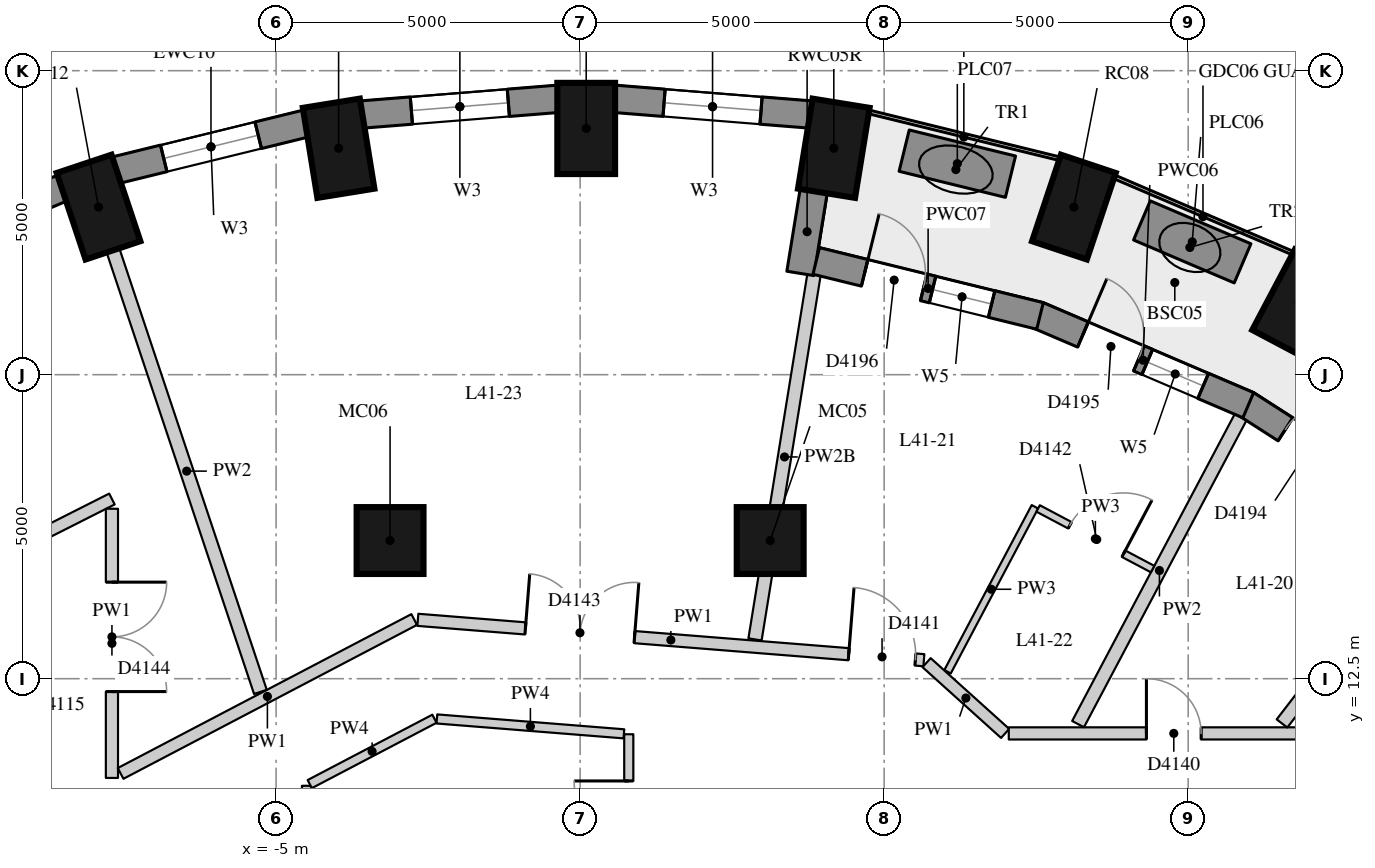
"""IFC4 building model, lengths in metres.
Left out: names, types, materials, properties, quantities, classifications, styles, units other than length and angle.
Written with IfcOpenShell. Run it as: python <this file> out.ifc"""

import sys

from ifc_helpers import new_model, si_unit, direction, frame, frame_2d, origin, origin_2d, place, context, subcontext, project, spatial, rectangle, extrude, element, fill, save


model = new_model("IFC4")
c1 = context("Model", 3, precision=1e-05, world=origin(), true_north=direction((0.0, 1.0)))
c2 = subcontext(c1, "Body", "Model", "MODEL_VIEW")
j1 = project(units=[si_unit("LENGTHUNIT", "METRE"), si_unit("PLANEANGLEUNIT", "RADIAN")], contexts=[c1])
p1 = place(None, origin())
s1 = spatial("IfcSite", under=j1, at=p1, CompositionType="ELEMENT")
p2 = place(p1, origin())
s2 = spatial("IfcBuilding", under=s1, at=p2, CompositionType="ELEMENT")
p3 = place(p2, frame((0.0, 0.0, 148.4)))
s3 = spatial("IfcBuildingStorey", under=s2, at=p3, CompositionType="ELEMENT", Elevation=148.4)
for number, where, z_axis, x_axis in (
    (1, (11.825, 18.676, 0.0), (0.0, 0.0, 1.0), (0.468, 0.884, 0.0)),
    (2, (8.12, 20.256, 0.0), (0.0, 0.0, 1.0), (0.317, 0.949, 0.0)),
    (3, (4.172, 21.224, 0.0), (0.0, 0.0, 1.0), (0.16, 0.987, 0.0)),
    (4, (0.1, 21.55, 0.0), (0.0, 0.0, 1.0), (0.0, 1.0, 0.0)),
    (5, (-3.972, 21.224, 0.0), (0.0, 0.0, 1.0), (-0.16, 0.987, 0.0)),
    (6, (-7.92, 20.256, 0.0), (0.0, 0.0, 1.0), (-0.317, 0.949, 0.0)),
):
    element("IfcColumn", number, at=place(p3, frame(where, z_axis=z_axis, x_axis=x_axis)), inside=s3, PredefinedType="COLUMN", context=c2, shape_type="SweptSolid", body=[
        extrude(rectangle(XDim=1.5, YDim=0.95, at=origin_2d()), origin(), (0.0, 0.0, 1.0), 3.3),
    ])
for number, where, z_axis, x_axis in (
    (7, (3.126, 14.772, 0.0), (0.0, 0.0, 1.0), (1.0, 0.0, 0.0)),
    (8, (-3.126, 14.772, 0.0), (0.0, 0.0, 1.0), (1.0, 0.0, 0.0)),
):
    element("IfcColumn", number, at=place(p3, frame(where, z_axis=z_axis, x_axis=x_axis)), inside=s3, PredefinedType="COLUMN", context=c2, shape_type="SweptSolid", body=[
        extrude(rectangle(XDim=1.1, YDim=1.1, at=origin_2d()), origin(), (0.0, 0.0, 1.0), 3.3),
    ])
p4 = place(p3, frame((3.801, 21.778, 0.0), z_axis=(0.0, 0.0, 1.0), x_axis=(-0.996812416891, 0.079780984773, 0.0)))
e9 = element("IfcWall", 9, at=p4, inside=s3, PredefinedType="SOLIDWALL", context=c2, shape_type="SweptSolid", body=[
    extrude(rectangle(XDim=3.256, YDim=0.45, at=frame_2d((1.628, 0.0))), origin(), (0.0, 0.0, 1.0), 3.02),
])
p5 = place(p4, frame((0.828, 0.0, 0.4)))
e10 = element("IfcOpeningElement", 10, at=p5, cuts=e9, PredefinedType="OPENING", context=c2, shape_type="SweptSolid", body=[
    extrude(rectangle(XDim=1.6, YDim=1.75, at=frame_2d((0.8, 0.875))), frame((0.0, 0.235, 0.0), z_axis=(0.0, -1.0, 0.0), x_axis=(1.0, 0.0, 0.0)), (0.0, 0.0, 1.0), 0.47),
])
p6 = place(p3, frame((-0.355, 22.038, 0.0), z_axis=(0.0, 0.0, 1.0), x_axis=(-0.996812416891, -0.079780984773, 0.0)))
e11 = element("IfcWall", 11, at=p6, inside=s3, PredefinedType="SOLIDWALL", context=c2, shape_type="SweptSolid", body=[
    extrude(rectangle(XDim=3.256, YDim=0.45, at=frame_2d((1.628, 0.0))), origin(), (0.0, 0.0, 1.0), 3.02),
])
p7 = place(p6, frame((0.828, 0.0, 0.4)))
e12 = element("IfcOpeningElement", 12, at=p7, cuts=e11, PredefinedType="OPENING", context=c2, shape_type="SweptSolid", body=[
    extrude(rectangle(XDim=1.6, YDim=1.75, at=frame_2d((0.8, 0.875))), frame((0.0, 0.235, 0.0), z_axis=(0.0, -1.0, 0.0), x_axis=(1.0, 0.0, 0.0)), (0.0, 0.0, 1.0), 0.47),
])
p8 = place(p3, frame((-4.499, 21.633, 0.0), z_axis=(0.0, 0.0, 1.0), x_axis=(-0.971232901476, -0.238131583563, 0.0)))
e13 = element("IfcWall", 13, at=p8, inside=s3, PredefinedType="SOLIDWALL", context=c2, shape_type="SweptSolid", body=[
    extrude(rectangle(XDim=3.237, YDim=0.45, at=frame_2d((1.618, 0.0))), origin(), (0.0, 0.0, 1.0), 3.02),
])
p9 = place(p8, frame((0.818, 0.0, 0.4)))
e14 = element("IfcOpeningElement", 14, at=p9, cuts=e13, PredefinedType="OPENING", context=c2, shape_type="SweptSolid", body=[
    extrude(rectangle(XDim=1.6, YDim=1.75, at=frame_2d((0.8, 0.875))), frame((0.0, 0.235, 0.0), z_axis=(0.0, -1.0, 0.0), x_axis=(1.0, 0.0, 0.0)), (0.0, 0.0, 1.0), 0.47),
])
p10 = place(p3, frame((-8.506, 20.574, 0.0), z_axis=(0.0, 0.0, 1.0), x_axis=(-0.919798725687, -0.392390499663, 0.0)))
e15 = element("IfcWall", 15, at=p10, inside=s3, PredefinedType="SOLIDWALL", context=c2, shape_type="SweptSolid", body=[
    extrude(rectangle(XDim=3.2, YDim=0.45, at=frame_2d((1.6, 0.0))), origin(), (0.0, 0.0, 1.0), 3.02),
])
p11 = place(p10, frame((0.8, 0.0, 0.4)))
e16 = element("IfcOpeningElement", 16, at=p11, cuts=e15, PredefinedType="OPENING", context=c2, shape_type="SweptSolid", body=[
    extrude(rectangle(XDim=1.6, YDim=1.75, at=frame_2d((0.8, 0.875))), frame((0.0, 0.235, 0.0), z_axis=(0.0, -1.0, 0.0), x_axis=(1.0, 0.0, 0.0)), (0.0, 0.0, 1.0), 0.47),
])
p12 = place(p3, frame((3.844, 20.538, 0.0), z_axis=(0.0, 0.0, 1.0), x_axis=(-0.159641024018, -0.98717513312, 0.0)))
e17 = element("IfcWall", 17, at=p12, inside=s3, PredefinedType="SOLIDWALL", context=c2, shape_type="SweptSolid", body=[
    extrude(rectangle(XDim=1.39, YDim=0.45, at=frame_2d((0.695, 0.0))), origin(), (0.0, 0.0, 1.0), 2.57),
])
p13 = place(p3, frame((14.054, 15.025, 0.0), z_axis=(0.0, 0.0, 1.0), x_axis=(-0.841393801846, 0.54042249233, 0.0)))
e18 = element("IfcWall", 18, at=p13, inside=s3, PredefinedType="SOLIDWALL", context=c2, shape_type="SweptSolid", body=[
    extrude(rectangle(XDim=3.683, YDim=0.45, at=frame_2d((1.841, 0.0))), origin(), (0.0, 0.0, 1.0), 3.02),
])
p14 = place(p13, frame((0.766, 0.0, 0.4)))
e19 = element("IfcOpeningElement", 19, at=p14, cuts=e18, PredefinedType="OPENING", context=c2, shape_type="SweptSolid", body=[
    extrude(rectangle(XDim=1.0, YDim=1.75, at=frame_2d((0.5, 0.875))), frame((0.0, 0.235, 0.0), z_axis=(0.0, -1.0, 0.0), x_axis=(1.0, 0.0, 0.0)), (0.0, 0.0, 1.0), 0.47),
])
p15 = place(p13, frame((1.916, 0.0, 0.0)))
e20 = element("IfcOpeningElement", 20, at=p15, cuts=e18, PredefinedType="OPENING", context=c2, shape_type="SweptSolid", body=[
    extrude(rectangle(XDim=1.0, YDim=2.15, at=frame_2d((0.5, 1.075))), frame((0.0, 0.235, 0.0), z_axis=(0.0, -1.0, 0.0), x_axis=(1.0, 0.0, 0.0)), (0.0, 0.0, 1.0), 0.47),
])
p16 = place(p3, frame((10.988, 16.998, 0.0), z_axis=(0.0, 0.0, 1.0), x_axis=(-0.919443425894, 0.393222311907, 0.0)))
e21 = element("IfcWall", 21, at=p16, inside=s3, PredefinedType="SOLIDWALL", context=c2, shape_type="SweptSolid", body=[
    extrude(rectangle(XDim=3.763, YDim=0.45, at=frame_2d((1.882, 0.0))), origin(), (0.0, 0.0, 1.0), 3.02),
])
p17 = place(p16, frame((0.807, 0.0, 0.4)))
e22 = element("IfcOpeningElement", 22, at=p17, cuts=e21, PredefinedType="OPENING", context=c2, shape_type="SweptSolid", body=[
    extrude(rectangle(XDim=1.0, YDim=1.75, at=frame_2d((0.5, 0.875))), frame((0.0, 0.235, 0.0), z_axis=(0.0, -1.0, 0.0), x_axis=(1.0, 0.0, 0.0)), (0.0, 0.0, 1.0), 0.47),
])
p18 = place(p16, frame((1.957, 0.0, 0.0)))
e23 = element("IfcOpeningElement", 23, at=p18, cuts=e21, PredefinedType="OPENING", context=c2, shape_type="SweptSolid", body=[
    extrude(rectangle(XDim=1.0, YDim=2.15, at=frame_2d((0.5, 1.075))), frame((0.0, 0.235, 0.0), z_axis=(0.0, -1.0, 0.0), x_axis=(1.0, 0.0, 0.0)), (0.0, 0.0, 1.0), 0.47),
])
p19 = place(p3, frame((7.563, 18.466, 0.0), z_axis=(0.0, 0.0, 1.0), x_axis=(-0.97110866251, 0.238637728782, 0.0)))
e24 = element("IfcWall", 24, at=p19, inside=s3, PredefinedType="SOLIDWALL", context=c2, shape_type="SweptSolid", body=[
    extrude(rectangle(XDim=3.789, YDim=0.45, at=frame_2d((1.895, 0.0))), origin(), (0.0, 0.0, 1.0), 3.02),
])
p20 = place(p19, frame((0.82, 0.0, 0.4)))
e25 = element("IfcOpeningElement", 25, at=p20, cuts=e24, PredefinedType="OPENING", context=c2, shape_type="SweptSolid", body=[
    extrude(rectangle(XDim=1.0, YDim=1.75, at=frame_2d((0.5, 0.875))), frame((0.0, 0.235, 0.0), z_axis=(0.0, -1.0, 0.0), x_axis=(1.0, 0.0, 0.0)), (0.0, 0.0, 1.0), 0.47),
])
p21 = place(p19, frame((1.97, 0.0, 0.0)))
e26 = element("IfcOpeningElement", 26, at=p21, cuts=e24, PredefinedType="OPENING", context=c2, shape_type="SweptSolid", body=[
    extrude(rectangle(XDim=1.0, YDim=2.15, at=frame_2d((0.5, 1.075))), frame((0.0, 0.235, 0.0), z_axis=(0.0, -1.0, 0.0), x_axis=(1.0, 0.0, 0.0)), (0.0, 0.0, 1.0), 0.47),
])
for number, where, z_axis, x_axis in (
    (27, (10.895, 19.331, 0.0), (0.0, 0.0, 1.0), (-0.92, 0.392, 0.0)),
    (28, (7.077, 20.757, 0.0), (0.0, 0.0, 1.0), (-0.971, 0.238, 0.0)),
):
    element("IfcWall", number, at=place(p3, frame(where, z_axis=z_axis, x_axis=x_axis)), inside=s3, PredefinedType="USERDEFINED", context=c2, shape_type="SweptSolid", body=[
        extrude(rectangle(XDim=1.8, YDim=0.7, at=frame_2d((0.9, 0.0))), origin(), (0.0, 0.0, 1.0), 0.75),
    ])
p22 = place(p3, frame((-10.416, 14.082, 0.0), z_axis=(0.0, 0.0, 1.0), x_axis=(0.892396808139, 0.451251522793, 0.0)))
e29 = element("IfcWall", 29, at=p22, inside=s3, PredefinedType="PARTITIONING", context=c2, shape_type="SweptSolid", body=[
    extrude(rectangle(XDim=3.044, YDim=0.2, at=frame_2d((1.522, 0.0))), origin(), (0.0, 0.0, 1.0), 3.02),
])
p23 = place(p3, frame((-7.7, 15.295, 0.0), z_axis=(0.0, 0.0, 1.0), x_axis=(0.0, -1.0, 0.0)))
e30 = element("IfcWall", 30, at=p23, inside=s3, PredefinedType="PARTITIONING", context=c2, shape_type="SweptSolid", body=[
    extrude(rectangle(XDim=4.427, YDim=0.2, at=frame_2d((2.214, 0.0))), origin(), (0.0, 0.0, 1.0), 3.02),
])
p24 = place(p23, frame((1.207, 0.0, 0.0)))
e31 = element("IfcOpeningElement", 31, at=p24, cuts=e30, PredefinedType="OPENING", context=c2, shape_type="SweptSolid", body=[
    extrude(rectangle(XDim=1.8, YDim=2.1, at=frame_2d((0.9, 1.05))), frame((0.0, 0.11, 0.0), z_axis=(0.0, -1.0, 0.0), x_axis=(1.0, 0.0, 0.0)), (0.0, 0.0, 1.0), 0.22),
])
p25 = place(p3, frame((-7.557, 10.942, 0.0), z_axis=(0.0, 0.0, 1.0), x_axis=(0.885672830659, 0.464309850244, 0.0)))
e32 = element("IfcWall", 32, at=p25, inside=s3, PredefinedType="PARTITIONING", context=c2, shape_type="SweptSolid", body=[
    extrude(rectangle(XDim=5.452, YDim=0.2, at=frame_2d((2.726, 0.0))), origin(), (0.0, 0.0, 1.0), 3.02),
])
p26 = place(p3, frame((-2.669, 13.468, 0.0), z_axis=(0.0, 0.0, 1.0), x_axis=(0.996831622407, -0.079540659849, 0.0)))
e33 = element("IfcWall", 33, at=p26, inside=s3, PredefinedType="PARTITIONING", context=c2, shape_type="SweptSolid", body=[
    extrude(rectangle(XDim=8.349, YDim=0.2, at=frame_2d((4.174, 0.0))), origin(), (0.0, 0.0, 1.0), 3.02),
])
p27 = place(p26, frame((7.109, 0.0, 0.0)))
e34 = element("IfcOpeningElement", 34, at=p27, cuts=e33, PredefinedType="OPENING", context=c2, shape_type="SweptSolid", body=[
    extrude(rectangle(XDim=1.1, YDim=2.1, at=frame_2d((0.55, 1.05))), frame((0.0, 0.11, 0.0), z_axis=(0.0, -1.0, 0.0), x_axis=(1.0, 0.0, 0.0)), (0.0, 0.0, 1.0), 0.22),
])
p28 = place(p26, frame((1.775, 0.0, 0.0)))
e35 = element("IfcOpeningElement", 35, at=p28, cuts=e33, PredefinedType="OPENING", context=c2, shape_type="SweptSolid", body=[
    extrude(rectangle(XDim=1.8, YDim=2.1, at=frame_2d((0.9, 1.05))), frame((0.0, 0.11, 0.0), z_axis=(0.0, -1.0, 0.0), x_axis=(1.0, 0.0, 0.0)), (0.0, 0.0, 1.0), 0.22),
])
p29 = place(p3, frame((5.698, 12.764, 0.0), z_axis=(0.0, 0.0, 1.0), x_axis=(0.742944876657, -0.669352605321, 0.0)))
e36 = element("IfcWall", 36, at=p29, inside=s3, PredefinedType="PARTITIONING", context=c2, shape_type="SweptSolid", body=[
    extrude(rectangle(XDim=1.738, YDim=0.2, at=frame_2d((0.869, 0.0))), origin(), (0.0, 0.0, 1.0), 3.02),
])
p30 = place(p3, frame((7.05, 11.6, 0.0), z_axis=(0.0, 0.0, 1.0), x_axis=(1.0, 0.0, 0.0)))
e37 = element("IfcWall", 37, at=p30, inside=s3, PredefinedType="PARTITIONING", context=c2, shape_type="SweptSolid", body=[
    extrude(rectangle(XDim=10.551, YDim=0.2, at=frame_2d((5.275, 0.0))), origin(), (0.0, 0.0, 1.0), 3.02),
])
p31 = place(p30, frame((2.264, 0.0, 0.0)))
e38 = element("IfcOpeningElement", 38, at=p31, cuts=e37, PredefinedType="OPENING", context=c2, shape_type="SweptSolid", body=[
    extrude(rectangle(XDim=0.9, YDim=2.1, at=frame_2d((0.45, 1.05))), frame((0.0, 0.11, 0.0), z_axis=(0.0, -1.0, 0.0), x_axis=(1.0, 0.0, 0.0)), (0.0, 0.0, 1.0), 0.22),
])
p32 = place(p30, frame((6.553, 0.0, 0.0)))
e39 = element("IfcOpeningElement", 39, at=p32, cuts=e37, PredefinedType="OPENING", context=c2, shape_type="SweptSolid", body=[
    extrude(rectangle(XDim=1.8, YDim=2.1, at=frame_2d((0.9, 1.05))), frame((0.0, 0.11, 0.0), z_axis=(0.0, -1.0, 0.0), x_axis=(1.0, 0.0, 0.0)), (0.0, 0.0, 1.0), 0.22),
])
p33 = place(p3, frame((0.8, 11.586, 0.0), z_axis=(0.0, 0.0, 1.0), x_axis=(0.0, -1.0, 0.0)))
e40 = element("IfcWall", 40, at=p33, inside=s3, PredefinedType="PARTITIONING", context=c2, shape_type="SweptSolid", body=[
    extrude(rectangle(XDim=2.436, YDim=0.15, at=frame_2d((1.218, 0.0))), origin(), (0.0, 0.0, 1.0), 3.02),
])
p34 = place(p33, frame((0.768, 0.0, 0.0)))
e41 = element("IfcOpeningElement", 41, at=p34, cuts=e40, PredefinedType="OPENING", context=c2, shape_type="SweptSolid", body=[
    extrude(rectangle(XDim=0.9, YDim=2.1, at=frame_2d((0.45, 1.05))), frame((0.0, 0.085, 0.0), z_axis=(0.0, -1.0, 0.0), x_axis=(1.0, 0.0, 0.0)), (0.0, 0.0, 1.0), 0.17),
])
p35 = place(p3, frame((-4.5, 7.942, 0.0), z_axis=(0.0, 0.0, 1.0), x_axis=(0.0, 1.0, 0.0)))
e42 = element("IfcWall", 42, at=p35, inside=s3, PredefinedType="PARTITIONING", context=c2, shape_type="SweptSolid", body=[
    extrude(rectangle(XDim=2.796, YDim=0.15, at=frame_2d((1.398, 0.0))), origin(), (0.0, 0.0, 1.0), 3.02),
])
p36 = place(p3, frame((-4.447, 10.766, 0.0), z_axis=(0.0, 0.0, 1.0), x_axis=(0.885701482048, 0.464255193507, 0.0)))
e43 = element("IfcWall", 43, at=p36, inside=s3, PredefinedType="PARTITIONING", context=c2, shape_type="SweptSolid", body=[
    extrude(rectangle(XDim=2.315, YDim=0.15, at=frame_2d((1.158, 0.0))), origin(), (0.0, 0.0, 1.0), 3.02),
])
p37 = place(p3, frame((-2.356, 11.838, 0.0), z_axis=(0.0, 0.0, 1.0), x_axis=(0.996845649151, -0.079364675829, 0.0)))
e44 = element("IfcWall", 44, at=p37, inside=s3, PredefinedType="PARTITIONING", context=c2, shape_type="SweptSolid", body=[
    extrude(rectangle(XDim=3.085, YDim=0.15, at=frame_2d((1.543, 0.0))), origin(), (0.0, 0.0, 1.0), 3.02),
])
p38 = place(p3, frame((13.916, 14.846, 0.0), z_axis=(0.0, 0.0, 1.0), x_axis=(-0.610023079405, -0.792383646091, 0.0)))
e45 = element("IfcWall", 45, at=p38, inside=s3, PredefinedType="PARTITIONING", context=c2, shape_type="SweptSolid", body=[
    extrude(rectangle(XDim=3.89, YDim=0.22, at=frame_2d((1.945, 0.0))), origin(), (0.0, 0.0, 1.0), 3.02),
])
p39 = place(p3, frame((10.865, 16.806, 0.0), z_axis=(0.0, 0.0, 1.0), x_axis=(-0.468046615648, -0.883703777054, 0.0)))
e46 = element("IfcWall", 46, at=p39, inside=s3, PredefinedType="PARTITIONING", context=c2, shape_type="SweptSolid", body=[
    extrude(rectangle(XDim=5.718, YDim=0.22, at=frame_2d((2.859, 0.0))), origin(), (0.0, 0.0, 1.0), 3.02),
])
p40 = place(p3, frame((3.847, 19.148, 0.0), z_axis=(0.0, 0.0, 1.0), x_axis=(-0.159656618209, -0.987172611179, 0.0)))
e47 = element("IfcWall", 47, at=p40, inside=s3, PredefinedType="PARTITIONING", context=c2, shape_type="SweptSolid", body=[
    extrude(rectangle(XDim=6.08, YDim=0.22, at=frame_2d((3.04, 0.0))), origin(), (0.0, 0.0, 1.0), 2.57),
])
p41 = place(p3, frame((-7.683, 19.545, 0.0), z_axis=(0.0, 0.0, 1.0), x_axis=(0.316706037399, -0.94852374028, 0.0)))
e48 = element("IfcWall", 48, at=p41, inside=s3, PredefinedType="PARTITIONING", context=c2, shape_type="SweptSolid", body=[
    extrude(rectangle(XDim=7.656, YDim=0.22, at=frame_2d((3.828, 0.0))), origin(), (0.0, 0.0, 1.0), 3.02),
])
p42 = place(p3, frame((6.042, 12.614, 0.0), z_axis=(0.0, 0.0, 1.0), x_axis=(0.46804844257, 0.883702809438, 0.0)))
e49 = element("IfcWall", 49, at=p42, inside=s3, PredefinedType="PARTITIONING", context=c2, shape_type="SweptSolid", body=[
    extrude(rectangle(XDim=3.071, YDim=0.12, at=frame_2d((1.535, 0.0))), origin(), (0.0, 0.0, 1.0), 3.02),
])
p43 = place(p3, frame((7.532, 15.3, 0.0), z_axis=(0.0, 0.0, 1.0), x_axis=(0.883707061275, -0.468040414764, 0.0)))
e50 = element("IfcWall", 50, at=p43, inside=s3, PredefinedType="PARTITIONING", context=c2, shape_type="SweptSolid", body=[
    extrude(rectangle(XDim=2.13, YDim=0.12, at=frame_2d((1.065, 0.0))), origin(), (0.0, 0.0, 1.0), 3.02),
])
p44 = place(p43, frame((0.59, 0.0, 0.0)))
e51 = element("IfcOpeningElement", 51, at=p44, cuts=e50, PredefinedType="OPENING", context=c2, shape_type="SweptSolid", body=[
    extrude(rectangle(XDim=1.0, YDim=2.1, at=frame_2d((0.5, 1.05))), frame((0.0, 0.07, 0.0), z_axis=(0.0, -1.0, 0.0), x_axis=(1.0, 0.0, 0.0)), (0.0, 0.0, 1.0), 0.14),
])
p45 = place(p5, origin())
e52 = element("IfcWindow", 52, at=p45, inside=s3, PartitioningType="SINGLE_PANEL", PredefinedType="WINDOW", context=c2, shape_type="SweptSolid", body=[
    extrude(rectangle(XDim=1.6, YDim=1.75, at=frame_2d((0.8, 0.875))), frame((0.0, 0.035, 0.0), z_axis=(0.0, -1.0, 0.0), x_axis=(1.0, 0.0, 0.0)), (0.0, 0.0, 1.0), 0.06),
])
fill(e10, e52)
p46 = place(p7, origin())
e53 = element("IfcWindow", 53, at=p46, inside=s3, PartitioningType="SINGLE_PANEL", PredefinedType="WINDOW", context=c2, shape_type="SweptSolid", body=[
    extrude(rectangle(XDim=1.6, YDim=1.75, at=frame_2d((0.8, 0.875))), frame((0.0, 0.035, 0.0), z_axis=(0.0, -1.0, 0.0), x_axis=(1.0, 0.0, 0.0)), (0.0, 0.0, 1.0), 0.06),
])
fill(e12, e53)
p47 = place(p9, origin())
e54 = element("IfcWindow", 54, at=p47, inside=s3, PartitioningType="SINGLE_PANEL", PredefinedType="WINDOW", context=c2, shape_type="SweptSolid", body=[
    extrude(rectangle(XDim=1.6, YDim=1.75, at=frame_2d((0.8, 0.875))), frame((0.0, 0.035, 0.0), z_axis=(0.0, -1.0, 0.0), x_axis=(1.0, 0.0, 0.0)), (0.0, 0.0, 1.0), 0.06),
])
fill(e14, e54)
p48 = place(p15, frame((1.0, 0.0, 0.0), z_axis=(0.0, 0.0, 1.0), x_axis=(-1.0, 0.0, 0.0)))
e55 = element("IfcDoor", 55, at=p48, inside=s3, OperationType="SINGLE_SWING_RIGHT", PredefinedType="DOOR", context=c2, shape_type="SweptSolid", body=[
    extrude(rectangle(XDim=1.0, YDim=2.15, at=frame_2d((0.5, 1.075))), frame((0.0, 0.075, 0.0), z_axis=(0.0, -1.0, 0.0), x_axis=(1.0, 0.0, 0.0)), (0.0, 0.0, 1.0), 0.05),
])
fill(e20, e55)
p49 = place(p17, origin())
e56 = element("IfcWindow", 56, at=p49, inside=s3, PartitioningType="SINGLE_PANEL", PredefinedType="WINDOW", context=c2, shape_type="SweptSolid", body=[
    extrude(rectangle(XDim=1.0, YDim=1.75, at=frame_2d((0.5, 0.875))), frame((0.0, 0.035, 0.0), z_axis=(0.0, -1.0, 0.0), x_axis=(1.0, 0.0, 0.0)), (0.0, 0.0, 1.0), 0.06),
])
fill(e22, e56)
p50 = place(p18, frame((1.0, 0.0, 0.0), z_axis=(0.0, 0.0, 1.0), x_axis=(-1.0, 0.0, 0.0)))
e57 = element("IfcDoor", 57, at=p50, inside=s3, OperationType="SINGLE_SWING_LEFT", PredefinedType="DOOR", context=c2, shape_type="SweptSolid", body=[
    extrude(rectangle(XDim=1.0, YDim=2.15, at=frame_2d((0.5, 1.075))), frame((0.0, 0.075, 0.0), z_axis=(0.0, -1.0, 0.0), x_axis=(1.0, 0.0, 0.0)), (0.0, 0.0, 1.0), 0.05),
])
fill(e23, e57)
p51 = place(p20, origin())
e58 = element("IfcWindow", 58, at=p51, inside=s3, PartitioningType="SINGLE_PANEL", PredefinedType="WINDOW", context=c2, shape_type="SweptSolid", body=[
    extrude(rectangle(XDim=1.0, YDim=1.75, at=frame_2d((0.5, 0.875))), frame((0.0, 0.035, 0.0), z_axis=(0.0, -1.0, 0.0), x_axis=(1.0, 0.0, 0.0)), (0.0, 0.0, 1.0), 0.06),
])
fill(e25, e58)
p52 = place(p21, frame((1.0, 0.0, 0.0), z_axis=(0.0, 0.0, 1.0), x_axis=(-1.0, 0.0, 0.0)))
e59 = element("IfcDoor", 59, at=p52, inside=s3, OperationType="SINGLE_SWING_LEFT", PredefinedType="DOOR", context=c2, shape_type="SweptSolid", body=[
    extrude(rectangle(XDim=1.0, YDim=2.15, at=frame_2d((0.5, 1.075))), frame((0.0, 0.075, 0.0), z_axis=(0.0, -1.0, 0.0), x_axis=(1.0, 0.0, 0.0)), (0.0, 0.0, 1.0), 0.05),
])
fill(e26, e59)
p53 = place(p31, origin())
e60 = element("IfcDoor", 60, at=p53, inside=s3, OperationType="SINGLE_SWING_LEFT", PredefinedType="DOOR", context=c2, shape_type="SweptSolid", body=[
    extrude(rectangle(XDim=0.9, YDim=2.1, at=frame_2d((0.45, 1.05))), frame((0.0, 0.025, 0.0), z_axis=(0.0, -1.0, 0.0), x_axis=(1.0, 0.0, 0.0)), (0.0, 0.0, 1.0), 0.05),
])
fill(e38, e60)
p54 = place(p27, origin())
e61 = element("IfcDoor", 61, at=p54, inside=s3, OperationType="SINGLE_SWING_LEFT", PredefinedType="DOOR", context=c2, shape_type="SweptSolid", body=[
    extrude(rectangle(XDim=1.1, YDim=2.1, at=frame_2d((0.55, 1.05))), frame((0.0, 0.025, 0.0), z_axis=(0.0, -1.0, 0.0), x_axis=(1.0, 0.0, 0.0)), (0.0, 0.0, 1.0), 0.05),
])
fill(e34, e61)
p55 = place(p44, origin())
e62 = element("IfcDoor", 62, at=p55, inside=s3, OperationType="SINGLE_SWING_RIGHT", PredefinedType="DOOR", context=c2, shape_type="SweptSolid", body=[
    extrude(rectangle(XDim=1.0, YDim=2.1, at=frame_2d((0.5, 1.05))), frame((0.0, 0.025, 0.0), z_axis=(0.0, -1.0, 0.0), x_axis=(1.0, 0.0, 0.0)), (0.0, 0.0, 1.0), 0.05),
])
fill(e51, e62)
p56 = place(p28, origin())
e63 = element("IfcDoor", 63, at=p56, inside=s3, OperationType="DOUBLE_DOOR_SINGLE_SWING", PredefinedType="DOOR", context=c2, shape_type="SweptSolid", body=[
    extrude(rectangle(XDim=1.8, YDim=2.1, at=frame_2d((0.9, 1.05))), frame((0.0, 0.025, 0.0), z_axis=(0.0, -1.0, 0.0), x_axis=(1.0, 0.0, 0.0)), (0.0, 0.0, 1.0), 0.05),
])
fill(e35, e63)
p57 = place(p24, origin())
e64 = element("IfcDoor", 64, at=p57, inside=s3, OperationType="DOUBLE_DOOR_SINGLE_SWING", PredefinedType="DOOR", context=c2, shape_type="SweptSolid", body=[
    extrude(rectangle(XDim=1.8, YDim=2.1, at=frame_2d((0.9, 1.05))), frame((0.0, 0.025, 0.0), z_axis=(0.0, -1.0, 0.0), x_axis=(1.0, 0.0, 0.0)), (0.0, 0.0, 1.0), 0.05),
])
fill(e31, e64)
p58 = place(p34, origin())
e65 = element("IfcDoor", 65, at=p58, inside=s3, OperationType="SINGLE_SWING_RIGHT", PredefinedType="DOOR", context=c2, shape_type="SweptSolid", body=[
    extrude(rectangle(XDim=0.9, YDim=2.1, at=frame_2d((0.45, 1.05))), frame((0.0, 0.025, 0.0), z_axis=(0.0, -1.0, 0.0), x_axis=(1.0, 0.0, 0.0)), (0.0, 0.0, 1.0), 0.05),
])
fill(e41, e65)
save(model, sys.argv[1])
